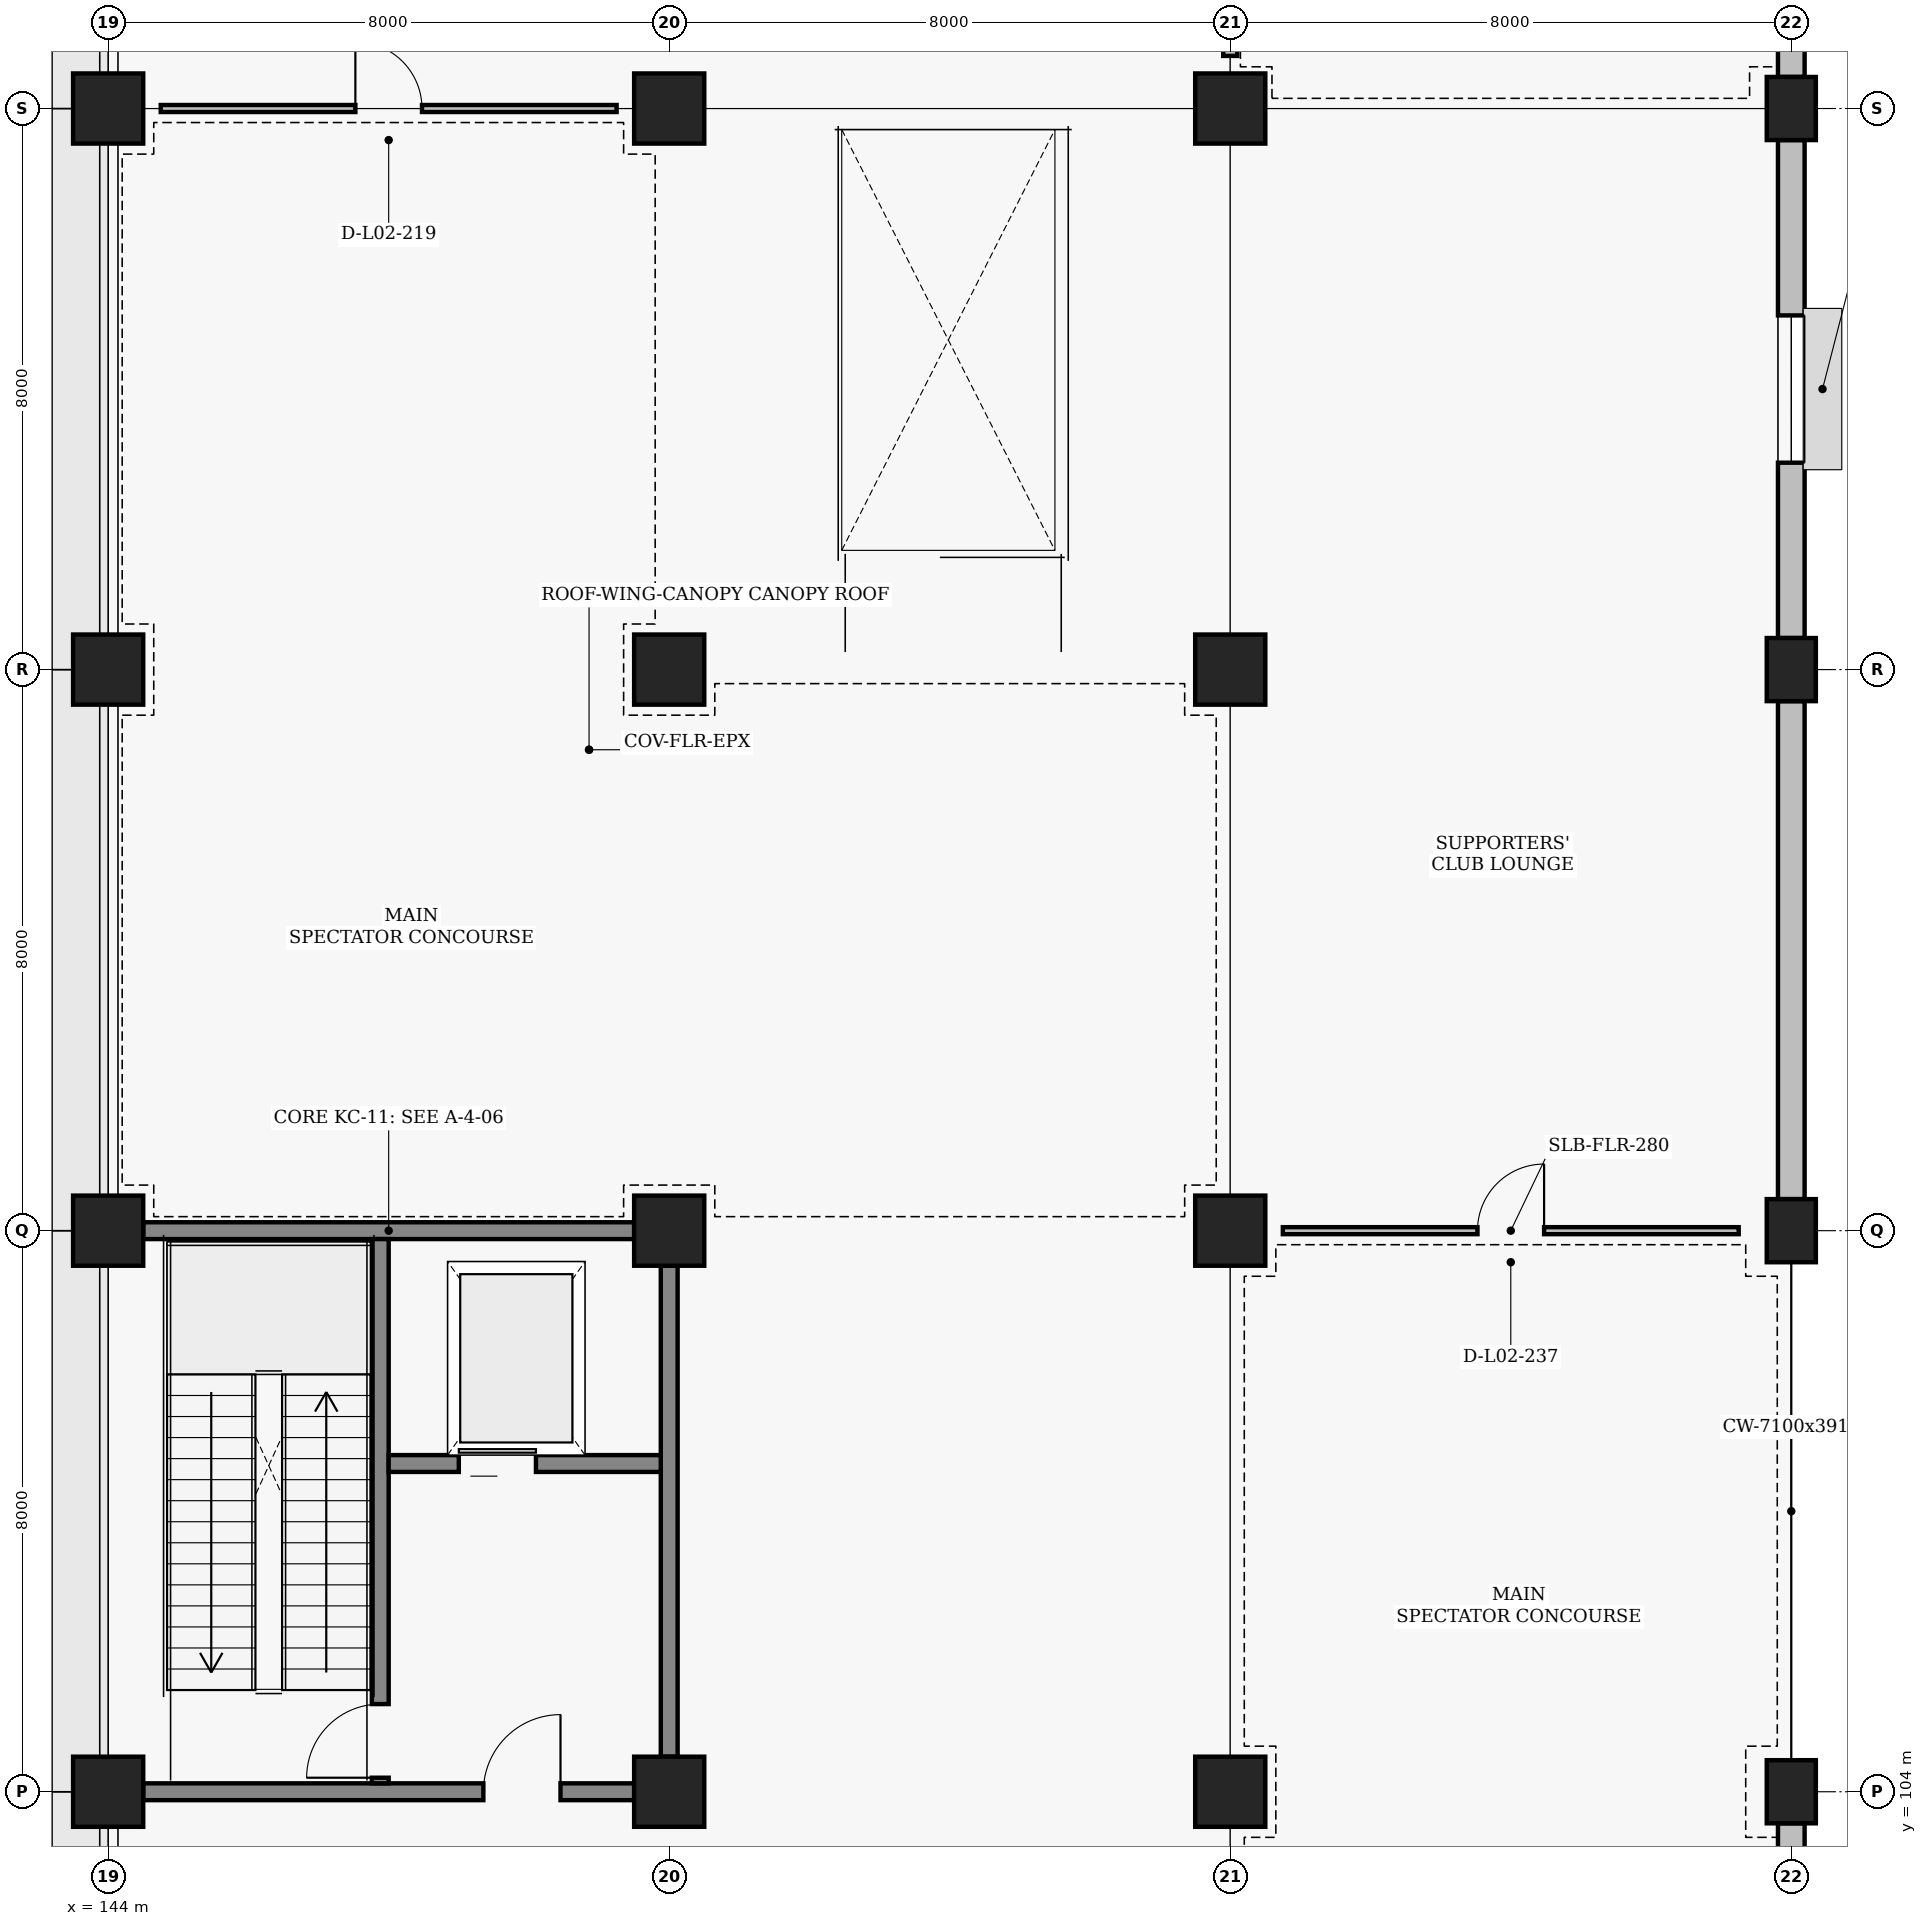
"""IFC4 building model, lengths in metres.
Left out: names, types, materials, properties, quantities, classifications, styles, units other than length and angle.
Written with IfcOpenShell. Run it as: python <this file> out.ifc"""

import sys

from ifc_helpers import new_model, si_unit, direction, frame, frame_2d, origin, origin_2d, place, context, subcontext, project, spatial, rectangle, extrude, element, fill, save


model = new_model("IFC4")
c1 = context("Model", 3, precision=1e-05, world=origin(), true_north=direction((0.0, 1.0)))
c2 = subcontext(c1, "Body", "Model", "MODEL_VIEW")
j1 = project(units=[si_unit("LENGTHUNIT", "METRE"), si_unit("PLANEANGLEUNIT", "RADIAN")], contexts=[c1])
p1 = place(None, origin())
s1 = spatial("IfcSite", under=j1, at=p1, CompositionType="ELEMENT")
p2 = place(p1, origin())
s2 = spatial("IfcBuilding", under=s1, at=p2, CompositionType="ELEMENT")
p3 = place(p2, frame((0.0, 0.0, 4.8)))
s3 = spatial("IfcBuildingStorey", under=s2, at=p3, CompositionType="ELEMENT", Elevation=4.8)
for number, where, z_axis, x_axis in (
    (1, (144.0, 104.0, 0.0), (0.0, 0.0, 1.0), (1.0, 0.0, 0.0)),
    (2, (144.0, 112.0, 0.0), (0.0, 0.0, 1.0), (1.0, 0.0, 0.0)),
    (3, (144.0, 120.0, 0.0), (0.0, 0.0, 1.0), (1.0, 0.0, 0.0)),
    (4, (144.0, 128.0, 0.0), (0.0, 0.0, 1.0), (1.0, 0.0, 0.0)),
    (5, (152.0, 104.0, 0.0), (0.0, 0.0, 1.0), (1.0, 0.0, 0.0)),
    (6, (152.0, 112.0, 0.0), (0.0, 0.0, 1.0), (1.0, 0.0, 0.0)),
    (7, (152.0, 120.0, 0.0), (0.0, 0.0, 1.0), (1.0, 0.0, 0.0)),
    (8, (152.0, 128.0, 0.0), (0.0, 0.0, 1.0), (1.0, 0.0, 0.0)),
    (9, (160.0, 104.0, 0.0), (0.0, 0.0, 1.0), (1.0, 0.0, 0.0)),
    (10, (160.0, 112.0, 0.0), (0.0, 0.0, 1.0), (1.0, 0.0, 0.0)),
    (11, (160.0, 120.0, 0.0), (0.0, 0.0, 1.0), (1.0, 0.0, 0.0)),
    (12, (160.0, 128.0, 0.0), (0.0, 0.0, 1.0), (1.0, 0.0, 0.0)),
):
    element("IfcColumn", number, at=place(p3, frame(where, z_axis=z_axis, x_axis=x_axis)), inside=s3, PredefinedType="COLUMN", context=c2, shape_type="SweptSolid", body=[
        extrude(rectangle(XDim=1.0, YDim=1.0, at=origin_2d()), origin(), (0.0, 0.0, 1.0), 4.8),
    ])
for number, where, z_axis, x_axis in (
    (13, (168.0, 104.0, 0.0), (0.0, 0.0, 1.0), (1.0, 0.0, 0.0)),
    (14, (168.0, 112.0, 0.0), (0.0, 0.0, 1.0), (1.0, 0.0, 0.0)),
    (15, (168.0, 120.0, 0.0), (0.0, 0.0, 1.0), (1.0, 0.0, 0.0)),
    (16, (168.0, 128.0, 0.0), (0.0, 0.0, 1.0), (1.0, 0.0, 0.0)),
):
    element("IfcColumn", number, at=place(p3, frame(where, z_axis=z_axis, x_axis=x_axis)), inside=s3, PredefinedType="COLUMN", context=c2, shape_type="SweptSolid", body=[
        extrude(rectangle(XDim=0.7, YDim=0.9, at=origin_2d()), origin(), (0.0, 0.0, 1.0), 4.8),
    ])
for number, where, z_axis, x_axis in (
    (17, (168.0, 96.45, 0.0), (0.0, 0.0, 1.0), (0.0, 1.0, 0.0)),
    (18, (168.0, 112.45, 0.0), (0.0, 0.0, 1.0), (0.0, 1.0, 0.0)),
):
    element("IfcWall", number, at=place(p3, frame(where, z_axis=z_axis, x_axis=x_axis)), inside=s3, PredefinedType="SOLIDWALL", context=c2, shape_type="SweptSolid", body=[
        extrude(rectangle(XDim=7.1, YDim=0.38, at=frame_2d((3.55, 0.0))), origin(), (0.0, 0.0, 1.0), 3.91),
    ])
p4 = place(p3, frame((168.0, 120.45, 0.0), z_axis=(0.0, 0.0, 1.0), x_axis=(0.0, 1.0, 0.0)))
e19 = element("IfcWall", 19, at=p4, inside=s3, PredefinedType="SOLIDWALL", context=c2, shape_type="SweptSolid", body=[
    extrude(rectangle(XDim=7.1, YDim=0.38, at=frame_2d((3.55, 0.0))), origin(), (0.0, 0.0, 1.0), 3.61),
])
p5 = place(p4, frame((2.5, 0.0, 0.95)))
e20 = element("IfcOpeningElement", 20, at=p5, cuts=e19, PredefinedType="OPENING", context=c2, shape_type="SweptSolid", body=[
    extrude(rectangle(XDim=2.1, YDim=1.9, at=frame_2d((1.05, 0.95))), frame((0.0, 0.2, 0.0), z_axis=(0.0, -1.0, 0.0), x_axis=(1.0, 0.0, 0.0)), (0.0, 0.0, 1.0), 0.4),
])
p6 = place(p3, frame((168.0, 128.45, 0.0), z_axis=(0.0, 0.0, 1.0), x_axis=(0.0, 1.0, 0.0)))
e21 = element("IfcWall", 21, at=p6, inside=s3, PredefinedType="SOLIDWALL", context=c2, shape_type="SweptSolid", body=[
    extrude(rectangle(XDim=7.1, YDim=0.38, at=frame_2d((3.55, 0.0))), origin(), (0.0, 0.0, 1.0), 3.61),
])
p7 = place(p3, frame((144.5, 104.0, 0.0), z_axis=(0.0, 0.0, 1.0), x_axis=(1.0, 0.0, 0.0)))
e22 = element("IfcWall", 22, at=p7, inside=s3, PredefinedType="SHEAR", context=c2, shape_type="SweptSolid", body=[
    extrude(rectangle(XDim=7.0, YDim=0.24, at=frame_2d((3.5, 0.0))), origin(), (0.0, 0.0, 1.0), 3.91),
])
p8 = place(p7, frame((4.85, 0.0, 0.0)))
e23 = element("IfcOpeningElement", 23, at=p8, cuts=e22, PredefinedType="OPENING", context=c2, shape_type="SweptSolid", body=[
    extrude(rectangle(XDim=1.1, YDim=2.2, at=frame_2d((0.55, 1.1))), frame((0.0, 0.13, 0.0), z_axis=(0.0, -1.0, 0.0), x_axis=(1.0, 0.0, 0.0)), (0.0, 0.0, 1.0), 0.26),
])
for number, where, z_axis, x_axis in (
    (24, (144.5, 112.0, 0.0), (0.0, 0.0, 1.0), (1.0, 0.0, 0.0)),
    (25, (152.0, 104.5, 0.0), (0.0, 0.0, 1.0), (0.0, 1.0, 0.0)),
):
    element("IfcWall", number, at=place(p3, frame(where, z_axis=z_axis, x_axis=x_axis)), inside=s3, PredefinedType="SHEAR", context=c2, shape_type="SweptSolid", body=[
        extrude(rectangle(XDim=7.0, YDim=0.24, at=frame_2d((3.5, 0.0))), origin(), (0.0, 0.0, 1.0), 3.91),
    ])
p9 = place(p3, frame((147.88, 104.12, 0.0), z_axis=(0.0, 0.0, 1.0), x_axis=(0.0, 1.0, 0.0)))
e26 = element("IfcWall", 26, at=p9, inside=s3, PredefinedType="SHEAR", context=c2, shape_type="SweptSolid", body=[
    extrude(rectangle(XDim=7.76, YDim=0.24, at=frame_2d((3.88, 0.0))), origin(), (0.0, 0.0, 1.0), 4.01),
])
p10 = place(p9, frame((0.08, 0.0, 0.0)))
e27 = element("IfcOpeningElement", 27, at=p10, cuts=e26, PredefinedType="OPENING", context=c2, shape_type="SweptSolid", body=[
    extrude(rectangle(XDim=1.05, YDim=2.15, at=frame_2d((0.525, 1.075))), frame((0.0, 0.13, 0.0), z_axis=(0.0, -1.0, 0.0), x_axis=(1.0, 0.0, 0.0)), (0.0, 0.0, 1.0), 0.26),
])
p11 = place(p3, frame((148.0, 108.68, 0.0), z_axis=(0.0, 0.0, 1.0), x_axis=(1.0, 0.0, 0.0)))
e28 = element("IfcWall", 28, at=p11, inside=s3, PredefinedType="SHEAR", context=c2, shape_type="SweptSolid", body=[
    extrude(rectangle(XDim=3.88, YDim=0.24, at=frame_2d((1.94, 0.0))), origin(), (0.0, 0.0, 1.0), 3.91),
])
p12 = place(p11, frame((1.0, 0.0, 0.0)))
e29 = element("IfcOpeningElement", 29, at=p12, cuts=e28, PredefinedType="OPENING", context=c2, shape_type="SweptSolid", body=[
    extrude(rectangle(XDim=1.1, YDim=2.15, at=frame_2d((0.55, 1.075))), frame((0.0, 0.13, 0.0), z_axis=(0.0, -1.0, 0.0), x_axis=(1.0, 0.0, 0.0)), (0.0, 0.0, 1.0), 0.26),
])
p13 = place(p3, frame((160.0, 128.75, 0.0), z_axis=(0.0, 0.0, 1.0), x_axis=(0.0, 1.0, 0.0)))
e30 = element("IfcWall", 30, at=p13, inside=s3, PredefinedType="PARTITIONING", context=c2, shape_type="SweptSolid", body=[
    extrude(rectangle(XDim=6.5, YDim=0.2, at=frame_2d((3.25, 0.0))), origin(), (0.0, 0.0, 1.0), 3.91),
])
p14 = place(p3, frame((144.75, 128.0, 0.0), z_axis=(0.0, 0.0, 1.0), x_axis=(1.0, 0.0, 0.0)))
e31 = element("IfcWall", 31, at=p14, inside=s3, PredefinedType="PARTITIONING", context=c2, shape_type="SweptSolid", body=[
    extrude(rectangle(XDim=6.5, YDim=0.1, at=frame_2d((3.25, 0.0))), origin(), (0.0, 0.0, 1.0), 3.91),
])
p15 = place(p14, frame((2.775, 0.0, 0.0)))
e32 = element("IfcOpeningElement", 32, at=p15, cuts=e31, PredefinedType="OPENING", context=c2, shape_type="SweptSolid", body=[
    extrude(rectangle(XDim=0.95, YDim=2.1, at=frame_2d((0.475, 1.05))), frame((0.0, 0.06, 0.0), z_axis=(0.0, -1.0, 0.0), x_axis=(1.0, 0.0, 0.0)), (0.0, 0.0, 1.0), 0.12),
])
p16 = place(p3, frame((160.75, 112.0, 0.0), z_axis=(0.0, 0.0, 1.0), x_axis=(1.0, 0.0, 0.0)))
e33 = element("IfcWall", 33, at=p16, inside=s3, PredefinedType="PARTITIONING", context=c2, shape_type="SweptSolid", body=[
    extrude(rectangle(XDim=6.5, YDim=0.1, at=frame_2d((3.25, 0.0))), origin(), (0.0, 0.0, 1.0), 3.91),
])
p17 = place(p16, frame((2.775, 0.0, 0.0)))
e34 = element("IfcOpeningElement", 34, at=p17, cuts=e33, PredefinedType="OPENING", context=c2, shape_type="SweptSolid", body=[
    extrude(rectangle(XDim=0.95, YDim=2.1, at=frame_2d((0.475, 1.05))), frame((0.0, 0.06, 0.0), z_axis=(0.0, -1.0, 0.0), x_axis=(1.0, 0.0, 0.0)), (0.0, 0.0, 1.0), 0.12),
])
p18 = place(p5, origin())
e35 = element("IfcWindow", 35, at=p18, inside=s3, PartitioningType="SINGLE_PANEL", PredefinedType="WINDOW", context=c2, shape_type="SweptSolid", body=[
    extrude(rectangle(XDim=2.1, YDim=1.9, at=frame_2d((1.05, 0.95))), frame((0.0, 0.03, 0.0), z_axis=(0.0, -1.0, 0.0), x_axis=(1.0, 0.0, 0.0)), (0.0, 0.0, 1.0), 0.06),
])
fill(e20, e35)
p19 = place(p8, origin())
e36 = element("IfcDoor", 36, at=p19, inside=s3, OperationType="SINGLE_SWING_RIGHT", PredefinedType="DOOR", context=c2, shape_type="SweptSolid", body=[
    extrude(rectangle(XDim=1.1, YDim=2.2, at=frame_2d((0.55, 1.1))), frame((0.0, 0.025, 0.0), z_axis=(0.0, -1.0, 0.0), x_axis=(1.0, 0.0, 0.0)), (0.0, 0.0, 1.0), 0.05),
])
fill(e23, e36)
p20 = place(p10, origin())
e37 = element("IfcDoor", 37, at=p20, inside=s3, OperationType="SINGLE_SWING_LEFT", PredefinedType="DOOR", context=c2, shape_type="SweptSolid", body=[
    extrude(rectangle(XDim=1.05, YDim=2.15, at=frame_2d((0.525, 1.075))), frame((0.0, 0.025, 0.0), z_axis=(0.0, -1.0, 0.0), x_axis=(1.0, 0.0, 0.0)), (0.0, 0.0, 1.0), 0.05),
])
fill(e27, e37)
p21 = place(p12, origin())
e38 = element("IfcDoor", 38, at=p21, inside=s3, OperationType="SLIDING_TO_LEFT", PredefinedType="DOOR", context=c2, shape_type="SweptSolid", body=[
    extrude(rectangle(XDim=1.1, YDim=2.15, at=frame_2d((0.55, 1.075))), frame((0.0, 0.025, 0.0), z_axis=(0.0, -1.0, 0.0), x_axis=(1.0, 0.0, 0.0)), (0.0, 0.0, 1.0), 0.05),
])
fill(e29, e38)
p22 = place(p15, origin())
e39 = element("IfcDoor", 39, at=p22, inside=s3, OperationType="SINGLE_SWING_LEFT", PredefinedType="DOOR", context=c2, shape_type="SweptSolid", body=[
    extrude(rectangle(XDim=0.95, YDim=2.1, at=frame_2d((0.475, 1.05))), frame((0.0, 0.025, 0.0), z_axis=(0.0, -1.0, 0.0), x_axis=(1.0, 0.0, 0.0)), (0.0, 0.0, 1.0), 0.05),
])
fill(e32, e39)
p23 = place(p17, origin())
e40 = element("IfcDoor", 40, at=p23, inside=s3, OperationType="SINGLE_SWING_RIGHT", PredefinedType="DOOR", context=c2, shape_type="SweptSolid", body=[
    extrude(rectangle(XDim=0.95, YDim=2.1, at=frame_2d((0.475, 1.05))), frame((0.0, 0.025, 0.0), z_axis=(0.0, -1.0, 0.0), x_axis=(1.0, 0.0, 0.0)), (0.0, 0.0, 1.0), 0.05),
])
fill(e34, e40)
save(model, sys.argv[1])
